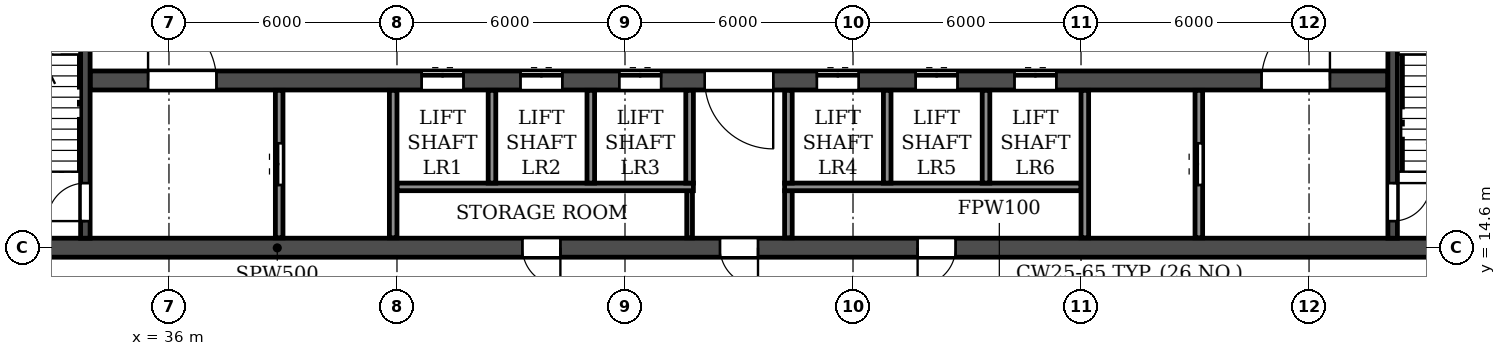
"""IFC4 building model, lengths in metres.
Left out: names, types, materials, properties, quantities, classifications, styles, units other than length and angle.
Written with IfcOpenShell. Run it as: python <this file> out.ifc"""

import sys

from ifc_helpers import new_model, si_unit, direction, frame, frame_2d, origin, place, context, subcontext, project, spatial, rectangle, extrude, element, fill, save


model = new_model("IFC4")
c1 = context("Model", 3, precision=1e-05, world=origin(), true_north=direction((0.0, 1.0)))
c2 = subcontext(c1, "Body", "Model", "MODEL_VIEW")
j1 = project(units=[si_unit("LENGTHUNIT", "METRE"), si_unit("PLANEANGLEUNIT", "RADIAN")], contexts=[c1])
p1 = place(None, origin())
s1 = spatial("IfcSite", under=j1, at=p1, CompositionType="ELEMENT")
p2 = place(p1, origin())
s2 = spatial("IfcBuilding", under=s1, at=p2, CompositionType="ELEMENT")
p3 = place(p2, frame((0.0, 0.0, 102.6)))
s3 = spatial("IfcBuildingStorey", under=s2, at=p3, CompositionType="ELEMENT", Elevation=102.6)
p4 = place(p3, frame((8.6, 14.6, 0.0), z_axis=(0.0, 0.0, 1.0), x_axis=(1.0, 0.0, 0.0)))
e1 = element("IfcWall", 1, at=p4, inside=s3, PredefinedType="SOLIDWALL", context=c2, shape_type="SweptSolid", body=[
    extrude(rectangle(XDim=84.8, YDim=0.5, at=frame_2d((42.4, 0.0))), origin(), (0.0, 0.0, 1.0), 3.0),
])
p5 = place(p4, frame((0.9, 0.0, 0.0)))
e2 = element("IfcOpeningElement", 2, at=p5, cuts=e1, PredefinedType="OPENING", context=c2, shape_type="SweptSolid", body=[
    extrude(rectangle(XDim=1.0, YDim=2.1, at=frame_2d((0.5, 1.05))), frame((0.0, 0.26, 0.0), z_axis=(0.0, -1.0, 0.0), x_axis=(1.0, 0.0, 0.0)), (0.0, 0.0, 1.0), 0.52),
])
p6 = place(p4, frame((5.6, 0.0, 0.0)))
e3 = element("IfcOpeningElement", 3, at=p6, cuts=e1, PredefinedType="OPENING", context=c2, shape_type="SweptSolid", body=[
    extrude(rectangle(XDim=1.0, YDim=2.1, at=frame_2d((0.5, 1.05))), frame((0.0, 0.26, 0.0), z_axis=(0.0, -1.0, 0.0), x_axis=(1.0, 0.0, 0.0)), (0.0, 0.0, 1.0), 0.52),
])
p7 = place(p4, frame((10.3, 0.0, 0.0)))
e4 = element("IfcOpeningElement", 4, at=p7, cuts=e1, PredefinedType="OPENING", context=c2, shape_type="SweptSolid", body=[
    extrude(rectangle(XDim=1.0, YDim=2.1, at=frame_2d((0.5, 1.05))), frame((0.0, 0.26, 0.0), z_axis=(0.0, -1.0, 0.0), x_axis=(1.0, 0.0, 0.0)), (0.0, 0.0, 1.0), 0.52),
])
p8 = place(p4, frame((18.2, 0.0, 0.0)))
e5 = element("IfcOpeningElement", 5, at=p8, cuts=e1, PredefinedType="OPENING", context=c2, shape_type="SweptSolid", body=[
    extrude(rectangle(XDim=1.0, YDim=2.1, at=frame_2d((0.5, 1.05))), frame((0.0, 0.26, 0.0), z_axis=(0.0, -1.0, 0.0), x_axis=(1.0, 0.0, 0.0)), (0.0, 0.0, 1.0), 0.52),
])
p9 = place(p4, frame((22.8, 0.0, 0.0)))
e6 = element("IfcOpeningElement", 6, at=p9, cuts=e1, PredefinedType="OPENING", context=c2, shape_type="SweptSolid", body=[
    extrude(rectangle(XDim=1.0, YDim=2.1, at=frame_2d((0.5, 1.05))), frame((0.0, 0.26, 0.0), z_axis=(0.0, -1.0, 0.0), x_axis=(1.0, 0.0, 0.0)), (0.0, 0.0, 1.0), 0.52),
])
p10 = place(p4, frame((36.7, 0.0, 0.0)))
e7 = element("IfcOpeningElement", 7, at=p10, cuts=e1, PredefinedType="OPENING", context=c2, shape_type="SweptSolid", body=[
    extrude(rectangle(XDim=1.0, YDim=2.1, at=frame_2d((0.5, 1.05))), frame((0.0, 0.26, 0.0), z_axis=(0.0, -1.0, 0.0), x_axis=(1.0, 0.0, 0.0)), (0.0, 0.0, 1.0), 0.52),
])
p11 = place(p4, frame((41.9, 0.0, 0.0)))
e8 = element("IfcOpeningElement", 8, at=p11, cuts=e1, PredefinedType="OPENING", context=c2, shape_type="SweptSolid", body=[
    extrude(rectangle(XDim=1.0, YDim=2.1, at=frame_2d((0.5, 1.05))), frame((0.0, 0.26, 0.0), z_axis=(0.0, -1.0, 0.0), x_axis=(1.0, 0.0, 0.0)), (0.0, 0.0, 1.0), 0.52),
])
p12 = place(p4, frame((47.1, 0.0, 0.0)))
e9 = element("IfcOpeningElement", 9, at=p12, cuts=e1, PredefinedType="OPENING", context=c2, shape_type="SweptSolid", body=[
    extrude(rectangle(XDim=1.0, YDim=2.1, at=frame_2d((0.5, 1.05))), frame((0.0, 0.26, 0.0), z_axis=(0.0, -1.0, 0.0), x_axis=(1.0, 0.0, 0.0)), (0.0, 0.0, 1.0), 0.52),
])
p13 = place(p4, frame((61.0, 0.0, 0.0)))
e10 = element("IfcOpeningElement", 10, at=p13, cuts=e1, PredefinedType="OPENING", context=c2, shape_type="SweptSolid", body=[
    extrude(rectangle(XDim=1.0, YDim=2.1, at=frame_2d((0.5, 1.05))), frame((0.0, 0.26, 0.0), z_axis=(0.0, -1.0, 0.0), x_axis=(1.0, 0.0, 0.0)), (0.0, 0.0, 1.0), 0.52),
])
p14 = place(p4, frame((65.6, 0.0, 0.0)))
e11 = element("IfcOpeningElement", 11, at=p14, cuts=e1, PredefinedType="OPENING", context=c2, shape_type="SweptSolid", body=[
    extrude(rectangle(XDim=1.0, YDim=2.1, at=frame_2d((0.5, 1.05))), frame((0.0, 0.26, 0.0), z_axis=(0.0, -1.0, 0.0), x_axis=(1.0, 0.0, 0.0)), (0.0, 0.0, 1.0), 0.52),
])
p15 = place(p4, frame((73.5, 0.0, 0.0)))
e12 = element("IfcOpeningElement", 12, at=p15, cuts=e1, PredefinedType="OPENING", context=c2, shape_type="SweptSolid", body=[
    extrude(rectangle(XDim=1.0, YDim=2.1, at=frame_2d((0.5, 1.05))), frame((0.0, 0.26, 0.0), z_axis=(0.0, -1.0, 0.0), x_axis=(1.0, 0.0, 0.0)), (0.0, 0.0, 1.0), 0.52),
])
p16 = place(p4, frame((79.6, 0.0, 0.0)))
e13 = element("IfcOpeningElement", 13, at=p16, cuts=e1, PredefinedType="OPENING", context=c2, shape_type="SweptSolid", body=[
    extrude(rectangle(XDim=1.0, YDim=2.1, at=frame_2d((0.5, 1.05))), frame((0.0, 0.26, 0.0), z_axis=(0.0, -1.0, 0.0), x_axis=(1.0, 0.0, 0.0)), (0.0, 0.0, 1.0), 0.52),
])
p17 = place(p3, frame((33.925, 19.0, 0.0), z_axis=(0.0, 0.0, 1.0), x_axis=(1.0, 0.0, 0.0)))
e14 = element("IfcWall", 14, at=p17, inside=s3, PredefinedType="SOLIDWALL", context=c2, shape_type="SweptSolid", body=[
    extrude(rectangle(XDim=34.15, YDim=0.5, at=frame_2d((17.075, 0.0))), origin(), (0.0, 0.0, 1.0), 3.0),
])
p18 = place(p17, frame((16.175, 0.0, 0.0)))
e15 = element("IfcOpeningElement", 15, at=p18, cuts=e14, PredefinedType="OPENING", context=c2, shape_type="SweptSolid", body=[
    extrude(rectangle(XDim=1.8, YDim=2.1, at=frame_2d((0.9, 1.05))), frame((0.0, 0.26, 0.0), z_axis=(0.0, -1.0, 0.0), x_axis=(1.0, 0.0, 0.0)), (0.0, 0.0, 1.0), 0.52),
])
p19 = place(p17, frame((1.525, 0.0, 0.0)))
e16 = element("IfcOpeningElement", 16, at=p19, cuts=e14, PredefinedType="OPENING", context=c2, shape_type="SweptSolid", body=[
    extrude(rectangle(XDim=1.8, YDim=2.1, at=frame_2d((0.9, 1.05))), frame((0.0, 0.26, 0.0), z_axis=(0.0, -1.0, 0.0), x_axis=(1.0, 0.0, 0.0)), (0.0, 0.0, 1.0), 0.52),
])
p20 = place(p17, frame((8.725, 0.0, 0.0)))
e17 = element("IfcOpeningElement", 17, at=p20, cuts=e14, PredefinedType="OPENING", context=c2, shape_type="SweptSolid", body=[
    extrude(rectangle(XDim=1.1, YDim=2.1, at=frame_2d((0.55, 1.05))), frame((0.0, 0.26, 0.0), z_axis=(0.0, -1.0, 0.0), x_axis=(1.0, 0.0, 0.0)), (0.0, 0.0, 1.0), 0.52),
])
p21 = place(p17, frame((11.325, 0.0, 0.0)))
e18 = element("IfcOpeningElement", 18, at=p21, cuts=e14, PredefinedType="OPENING", context=c2, shape_type="SweptSolid", body=[
    extrude(rectangle(XDim=1.1, YDim=2.1, at=frame_2d((0.55, 1.05))), frame((0.0, 0.26, 0.0), z_axis=(0.0, -1.0, 0.0), x_axis=(1.0, 0.0, 0.0)), (0.0, 0.0, 1.0), 0.52),
])
p22 = place(p17, frame((13.925, 0.0, 0.0)))
e19 = element("IfcOpeningElement", 19, at=p22, cuts=e14, PredefinedType="OPENING", context=c2, shape_type="SweptSolid", body=[
    extrude(rectangle(XDim=1.1, YDim=2.1, at=frame_2d((0.55, 1.05))), frame((0.0, 0.26, 0.0), z_axis=(0.0, -1.0, 0.0), x_axis=(1.0, 0.0, 0.0)), (0.0, 0.0, 1.0), 0.52),
])
p23 = place(p17, frame((19.125, 0.0, 0.0)))
e20 = element("IfcOpeningElement", 20, at=p23, cuts=e14, PredefinedType="OPENING", context=c2, shape_type="SweptSolid", body=[
    extrude(rectangle(XDim=1.1, YDim=2.1, at=frame_2d((0.55, 1.05))), frame((0.0, 0.26, 0.0), z_axis=(0.0, -1.0, 0.0), x_axis=(1.0, 0.0, 0.0)), (0.0, 0.0, 1.0), 0.52),
])
p24 = place(p17, frame((21.725, 0.0, 0.0)))
e21 = element("IfcOpeningElement", 21, at=p24, cuts=e14, PredefinedType="OPENING", context=c2, shape_type="SweptSolid", body=[
    extrude(rectangle(XDim=1.1, YDim=2.1, at=frame_2d((0.55, 1.05))), frame((0.0, 0.26, 0.0), z_axis=(0.0, -1.0, 0.0), x_axis=(1.0, 0.0, 0.0)), (0.0, 0.0, 1.0), 0.52),
])
p25 = place(p17, frame((24.325, 0.0, 0.0)))
e22 = element("IfcOpeningElement", 22, at=p25, cuts=e14, PredefinedType="OPENING", context=c2, shape_type="SweptSolid", body=[
    extrude(rectangle(XDim=1.1, YDim=2.1, at=frame_2d((0.55, 1.05))), frame((0.0, 0.26, 0.0), z_axis=(0.0, -1.0, 0.0), x_axis=(1.0, 0.0, 0.0)), (0.0, 0.0, 1.0), 0.52),
])
p26 = place(p17, frame((30.825, 0.0, 0.0)))
e23 = element("IfcOpeningElement", 23, at=p26, cuts=e14, PredefinedType="OPENING", context=c2, shape_type="SweptSolid", body=[
    extrude(rectangle(XDim=1.8, YDim=2.1, at=frame_2d((0.9, 1.05))), frame((0.0, 0.26, 0.0), z_axis=(0.0, -1.0, 0.0), x_axis=(1.0, 0.0, 0.0)), (0.0, 0.0, 1.0), 0.52),
])
p27 = place(p3, frame((33.8, 14.85, 0.0), z_axis=(0.0, 0.0, 1.0), x_axis=(0.0, 1.0, 0.0)))
e24 = element("IfcWall", 24, at=p27, inside=s3, PredefinedType="SOLIDWALL", context=c2, shape_type="SweptSolid", body=[
    extrude(rectangle(XDim=7.625, YDim=0.25, at=frame_2d((3.812, 0.0))), origin(), (0.0, 0.0, 1.0), 3.0),
])
p28 = place(p27, frame((0.45, 0.0, 0.0)))
e25 = element("IfcOpeningElement", 25, at=p28, cuts=e24, PredefinedType="OPENING", context=c2, shape_type="SweptSolid", body=[
    extrude(rectangle(XDim=1.0, YDim=2.1, at=frame_2d((0.5, 1.05))), frame((0.0, 0.135, 0.0), z_axis=(0.0, -1.0, 0.0), x_axis=(1.0, 0.0, 0.0)), (0.0, 0.0, 1.0), 0.27),
])
p29 = place(p3, frame((68.2, 14.85, 0.0), z_axis=(0.0, 0.0, 1.0), x_axis=(0.0, 1.0, 0.0)))
e26 = element("IfcWall", 26, at=p29, inside=s3, PredefinedType="SOLIDWALL", context=c2, shape_type="SweptSolid", body=[
    extrude(rectangle(XDim=7.625, YDim=0.25, at=frame_2d((3.812, 0.0))), origin(), (0.0, 0.0, 1.0), 3.0),
])
p30 = place(p29, frame((0.45, 0.0, 0.0)))
e27 = element("IfcOpeningElement", 27, at=p30, cuts=e26, PredefinedType="OPENING", context=c2, shape_type="SweptSolid", body=[
    extrude(rectangle(XDim=1.0, YDim=2.1, at=frame_2d((0.5, 1.05))), frame((0.0, 0.135, 0.0), z_axis=(0.0, -1.0, 0.0), x_axis=(1.0, 0.0, 0.0)), (0.0, 0.0, 1.0), 0.27),
])
p31 = place(p3, frame((49.7, 14.86, 0.0), z_axis=(0.0, 0.0, 1.0), x_axis=(0.0, 1.0, 0.0)))
e28 = element("IfcWall", 28, at=p31, inside=s3, PredefinedType="PARTITIONING", context=c2, shape_type="SweptSolid", body=[
    extrude(rectangle(XDim=1.24, YDim=0.15, at=frame_2d((0.62, 0.0))), origin(), (0.0, 0.0, 1.0), 3.0),
])
p32 = place(p3, frame((52.3, 14.86, 0.0), z_axis=(0.0, 0.0, 1.0), x_axis=(0.0, 1.0, 0.0)))
e29 = element("IfcWall", 29, at=p32, inside=s3, PredefinedType="PARTITIONING", context=c2, shape_type="SweptSolid", body=[
    extrude(rectangle(XDim=1.24, YDim=0.2, at=frame_2d((0.62, 0.0))), origin(), (0.0, 0.0, 1.0), 3.0),
])
for number, where, z_axis, x_axis in (
    (30, (42.0, 16.2, 0.0), (0.0, 0.0, 1.0), (1.0, 0.0, 0.0)),
    (31, (52.2, 16.2, 0.0), (0.0, 0.0, 1.0), (1.0, 0.0, 0.0)),
):
    element("IfcWall", number, at=place(p3, frame(where, z_axis=z_axis, x_axis=x_axis)), inside=s3, PredefinedType="PARTITIONING", context=c2, shape_type="SweptSolid", body=[
        extrude(rectangle(XDim=7.8, YDim=0.2, at=frame_2d((3.9, 0.0))), origin(), (0.0, 0.0, 1.0), 3.0),
    ])
p33 = place(p3, frame((38.9, 14.86, 0.0), z_axis=(0.0, 0.0, 1.0), x_axis=(0.0, 1.0, 0.0)))
e32 = element("IfcWall", 32, at=p33, inside=s3, PredefinedType="PARTITIONING", context=c2, shape_type="SweptSolid", body=[
    extrude(rectangle(XDim=3.88, YDim=0.2, at=frame_2d((1.94, 0.0))), origin(), (0.0, 0.0, 1.0), 3.0),
])
p34 = place(p33, frame((1.39, 0.0, 0.0)))
e33 = element("IfcOpeningElement", 33, at=p34, cuts=e32, PredefinedType="OPENING", context=c2, shape_type="SweptSolid", body=[
    extrude(rectangle(XDim=1.1, YDim=2.1, at=frame_2d((0.55, 1.05))), frame((0.0, 0.11, 0.0), z_axis=(0.0, -1.0, 0.0), x_axis=(1.0, 0.0, 0.0)), (0.0, 0.0, 1.0), 0.22),
])
p35 = place(p3, frame((41.9, 14.86, 0.0), z_axis=(0.0, 0.0, 1.0), x_axis=(0.0, 1.0, 0.0)))
e34 = element("IfcWall", 34, at=p35, inside=s3, PredefinedType="PARTITIONING", context=c2, shape_type="SweptSolid", body=[
    extrude(rectangle(XDim=3.88, YDim=0.2, at=frame_2d((1.94, 0.0))), origin(), (0.0, 0.0, 1.0), 3.0),
])
for number, where, z_axis, x_axis in (
    (35, (44.5, 16.3, 0.0), (0.0, 0.0, 1.0), (0.0, 1.0, 0.0)),
    (36, (47.1, 16.3, 0.0), (0.0, 0.0, 1.0), (0.0, 1.0, 0.0)),
    (37, (49.7, 16.3, 0.0), (0.0, 0.0, 1.0), (0.0, 1.0, 0.0)),
    (38, (52.3, 16.3, 0.0), (0.0, 0.0, 1.0), (0.0, 1.0, 0.0)),
    (39, (54.9, 16.3, 0.0), (0.0, 0.0, 1.0), (0.0, 1.0, 0.0)),
    (40, (57.5, 16.3, 0.0), (0.0, 0.0, 1.0), (0.0, 1.0, 0.0)),
):
    element("IfcWall", number, at=place(p3, frame(where, z_axis=z_axis, x_axis=x_axis)), inside=s3, PredefinedType="PARTITIONING", context=c2, shape_type="SweptSolid", body=[
        extrude(rectangle(XDim=2.44, YDim=0.2, at=frame_2d((1.22, 0.0))), origin(), (0.0, 0.0, 1.0), 3.0),
    ])
p36 = place(p3, frame((60.1, 14.86, 0.0), z_axis=(0.0, 0.0, 1.0), x_axis=(0.0, 1.0, 0.0)))
e41 = element("IfcWall", 41, at=p36, inside=s3, PredefinedType="PARTITIONING", context=c2, shape_type="SweptSolid", body=[
    extrude(rectangle(XDim=3.88, YDim=0.2, at=frame_2d((1.94, 0.0))), origin(), (0.0, 0.0, 1.0), 3.0),
])
p37 = place(p3, frame((63.1, 14.86, 0.0), z_axis=(0.0, 0.0, 1.0), x_axis=(0.0, 1.0, 0.0)))
e42 = element("IfcWall", 42, at=p37, inside=s3, PredefinedType="PARTITIONING", context=c2, shape_type="SweptSolid", body=[
    extrude(rectangle(XDim=3.88, YDim=0.2, at=frame_2d((1.94, 0.0))), origin(), (0.0, 0.0, 1.0), 3.0),
])
p38 = place(p37, frame((1.39, 0.0, 0.0)))
e43 = element("IfcOpeningElement", 43, at=p38, cuts=e42, PredefinedType="OPENING", context=c2, shape_type="SweptSolid", body=[
    extrude(rectangle(XDim=1.1, YDim=2.1, at=frame_2d((0.55, 1.05))), frame((0.0, 0.11, 0.0), z_axis=(0.0, -1.0, 0.0), x_axis=(1.0, 0.0, 0.0)), (0.0, 0.0, 1.0), 0.22),
])
p39 = place(p10, frame((1.0, 0.0, 0.0), z_axis=(0.0, 0.0, 1.0), x_axis=(-1.0, 0.0, 0.0)))
e44 = element("IfcDoor", 44, at=p39, inside=s3, OperationType="SINGLE_SWING_LEFT", PredefinedType="DOOR", context=c2, shape_type="SweptSolid", body=[
    extrude(rectangle(XDim=1.0, YDim=2.1, at=frame_2d((0.5, 1.05))), frame((0.0, 0.025, 0.0), z_axis=(0.0, -1.0, 0.0), x_axis=(1.0, 0.0, 0.0)), (0.0, 0.0, 1.0), 0.05),
])
fill(e7, e44)
p40 = place(p11, frame((1.0, 0.0, 0.0), z_axis=(0.0, 0.0, 1.0), x_axis=(-1.0, 0.0, 0.0)))
e45 = element("IfcDoor", 45, at=p40, inside=s3, OperationType="SINGLE_SWING_LEFT", PredefinedType="DOOR", context=c2, shape_type="SweptSolid", body=[
    extrude(rectangle(XDim=1.0, YDim=2.1, at=frame_2d((0.5, 1.05))), frame((0.0, 0.025, 0.0), z_axis=(0.0, -1.0, 0.0), x_axis=(1.0, 0.0, 0.0)), (0.0, 0.0, 1.0), 0.05),
])
fill(e8, e45)
p41 = place(p12, frame((1.0, 0.0, 0.0), z_axis=(0.0, 0.0, 1.0), x_axis=(-1.0, 0.0, 0.0)))
e46 = element("IfcDoor", 46, at=p41, inside=s3, OperationType="SINGLE_SWING_RIGHT", PredefinedType="DOOR", context=c2, shape_type="SweptSolid", body=[
    extrude(rectangle(XDim=1.0, YDim=2.1, at=frame_2d((0.5, 1.05))), frame((0.0, 0.025, 0.0), z_axis=(0.0, -1.0, 0.0), x_axis=(1.0, 0.0, 0.0)), (0.0, 0.0, 1.0), 0.05),
])
fill(e9, e46)
p42 = place(p38, origin())
e47 = element("IfcDoor", 47, at=p42, inside=s3, OperationType="DOUBLE_DOOR_SLIDING", PredefinedType="DOOR", context=c2, shape_type="SweptSolid", body=[
    extrude(rectangle(XDim=1.1, YDim=2.1, at=frame_2d((0.55, 1.05))), frame((0.0, 0.025, 0.0), z_axis=(0.0, -1.0, 0.0), x_axis=(1.0, 0.0, 0.0)), (0.0, 0.0, 1.0), 0.05),
])
fill(e43, e47)
p43 = place(p30, frame((1.0, 0.0, 0.0), z_axis=(0.0, 0.0, 1.0), x_axis=(-1.0, 0.0, 0.0)))
e48 = element("IfcDoor", 48, at=p43, inside=s3, OperationType="SINGLE_SWING_LEFT", PredefinedType="DOOR", context=c2, shape_type="SweptSolid", body=[
    extrude(rectangle(XDim=1.0, YDim=2.1, at=frame_2d((0.5, 1.05))), frame((0.0, 0.025, 0.0), z_axis=(0.0, -1.0, 0.0), x_axis=(1.0, 0.0, 0.0)), (0.0, 0.0, 1.0), 0.05),
])
fill(e27, e48)
p44 = place(p28, origin())
e49 = element("IfcDoor", 49, at=p44, inside=s3, OperationType="SINGLE_SWING_LEFT", PredefinedType="DOOR", context=c2, shape_type="SweptSolid", body=[
    extrude(rectangle(XDim=1.0, YDim=2.1, at=frame_2d((0.5, 1.05))), frame((0.0, 0.025, 0.0), z_axis=(0.0, -1.0, 0.0), x_axis=(1.0, 0.0, 0.0)), (0.0, 0.0, 1.0), 0.05),
])
fill(e25, e49)
p45 = place(p34, origin())
e50 = element("IfcDoor", 50, at=p45, inside=s3, OperationType="DOUBLE_DOOR_SLIDING", PredefinedType="DOOR", context=c2, shape_type="SweptSolid", body=[
    extrude(rectangle(XDim=1.1, YDim=2.1, at=frame_2d((0.55, 1.05))), frame((0.0, 0.025, 0.0), z_axis=(0.0, -1.0, 0.0), x_axis=(1.0, 0.0, 0.0)), (0.0, 0.0, 1.0), 0.05),
])
fill(e33, e50)
p46 = place(p18, frame((1.8, 0.0, 0.0), z_axis=(0.0, 0.0, 1.0), x_axis=(-1.0, 0.0, 0.0)))
e51 = element("IfcDoor", 51, at=p46, inside=s3, OperationType="DOUBLE_DOOR_SINGLE_SWING", PredefinedType="DOOR", context=c2, shape_type="SweptSolid", body=[
    extrude(rectangle(XDim=1.8, YDim=2.1, at=frame_2d((0.9, 1.05))), frame((0.0, 0.025, 0.0), z_axis=(0.0, -1.0, 0.0), x_axis=(1.0, 0.0, 0.0)), (0.0, 0.0, 1.0), 0.05),
])
fill(e15, e51)
p47 = place(p19, origin())
e52 = element("IfcDoor", 52, at=p47, inside=s3, OperationType="DOUBLE_DOOR_SINGLE_SWING", PredefinedType="DOOR", context=c2, shape_type="SweptSolid", body=[
    extrude(rectangle(XDim=1.8, YDim=2.1, at=frame_2d((0.9, 1.05))), frame((0.0, 0.025, 0.0), z_axis=(0.0, -1.0, 0.0), x_axis=(1.0, 0.0, 0.0)), (0.0, 0.0, 1.0), 0.05),
])
fill(e16, e52)
p48 = place(p20, origin())
e53 = element("IfcDoor", 53, at=p48, inside=s3, OperationType="DOUBLE_DOOR_SLIDING", PredefinedType="DOOR", context=c2, shape_type="SweptSolid", body=[
    extrude(rectangle(XDim=1.1, YDim=2.1, at=frame_2d((0.55, 1.05))), frame((0.0, 0.025, 0.0), z_axis=(0.0, -1.0, 0.0), x_axis=(1.0, 0.0, 0.0)), (0.0, 0.0, 1.0), 0.05),
])
fill(e17, e53)
p49 = place(p21, origin())
e54 = element("IfcDoor", 54, at=p49, inside=s3, OperationType="DOUBLE_DOOR_SLIDING", PredefinedType="DOOR", context=c2, shape_type="SweptSolid", body=[
    extrude(rectangle(XDim=1.1, YDim=2.1, at=frame_2d((0.55, 1.05))), frame((0.0, 0.025, 0.0), z_axis=(0.0, -1.0, 0.0), x_axis=(1.0, 0.0, 0.0)), (0.0, 0.0, 1.0), 0.05),
])
fill(e18, e54)
p50 = place(p22, origin())
e55 = element("IfcDoor", 55, at=p50, inside=s3, OperationType="DOUBLE_DOOR_SLIDING", PredefinedType="DOOR", context=c2, shape_type="SweptSolid", body=[
    extrude(rectangle(XDim=1.1, YDim=2.1, at=frame_2d((0.55, 1.05))), frame((0.0, 0.025, 0.0), z_axis=(0.0, -1.0, 0.0), x_axis=(1.0, 0.0, 0.0)), (0.0, 0.0, 1.0), 0.05),
])
fill(e19, e55)
p51 = place(p23, origin())
e56 = element("IfcDoor", 56, at=p51, inside=s3, OperationType="DOUBLE_DOOR_SLIDING", PredefinedType="DOOR", context=c2, shape_type="SweptSolid", body=[
    extrude(rectangle(XDim=1.1, YDim=2.1, at=frame_2d((0.55, 1.05))), frame((0.0, 0.025, 0.0), z_axis=(0.0, -1.0, 0.0), x_axis=(1.0, 0.0, 0.0)), (0.0, 0.0, 1.0), 0.05),
])
fill(e20, e56)
p52 = place(p24, origin())
e57 = element("IfcDoor", 57, at=p52, inside=s3, OperationType="DOUBLE_DOOR_SLIDING", PredefinedType="DOOR", context=c2, shape_type="SweptSolid", body=[
    extrude(rectangle(XDim=1.1, YDim=2.1, at=frame_2d((0.55, 1.05))), frame((0.0, 0.025, 0.0), z_axis=(0.0, -1.0, 0.0), x_axis=(1.0, 0.0, 0.0)), (0.0, 0.0, 1.0), 0.05),
])
fill(e21, e57)
p53 = place(p25, origin())
e58 = element("IfcDoor", 58, at=p53, inside=s3, OperationType="DOUBLE_DOOR_SLIDING", PredefinedType="DOOR", context=c2, shape_type="SweptSolid", body=[
    extrude(rectangle(XDim=1.1, YDim=2.1, at=frame_2d((0.55, 1.05))), frame((0.0, 0.025, 0.0), z_axis=(0.0, -1.0, 0.0), x_axis=(1.0, 0.0, 0.0)), (0.0, 0.0, 1.0), 0.05),
])
fill(e22, e58)
p54 = place(p26, origin())
e59 = element("IfcDoor", 59, at=p54, inside=s3, OperationType="DOUBLE_DOOR_SINGLE_SWING", PredefinedType="DOOR", context=c2, shape_type="SweptSolid", body=[
    extrude(rectangle(XDim=1.8, YDim=2.1, at=frame_2d((0.9, 1.05))), frame((0.0, 0.025, 0.0), z_axis=(0.0, -1.0, 0.0), x_axis=(1.0, 0.0, 0.0)), (0.0, 0.0, 1.0), 0.05),
])
fill(e23, e59)
save(model, sys.argv[1])
